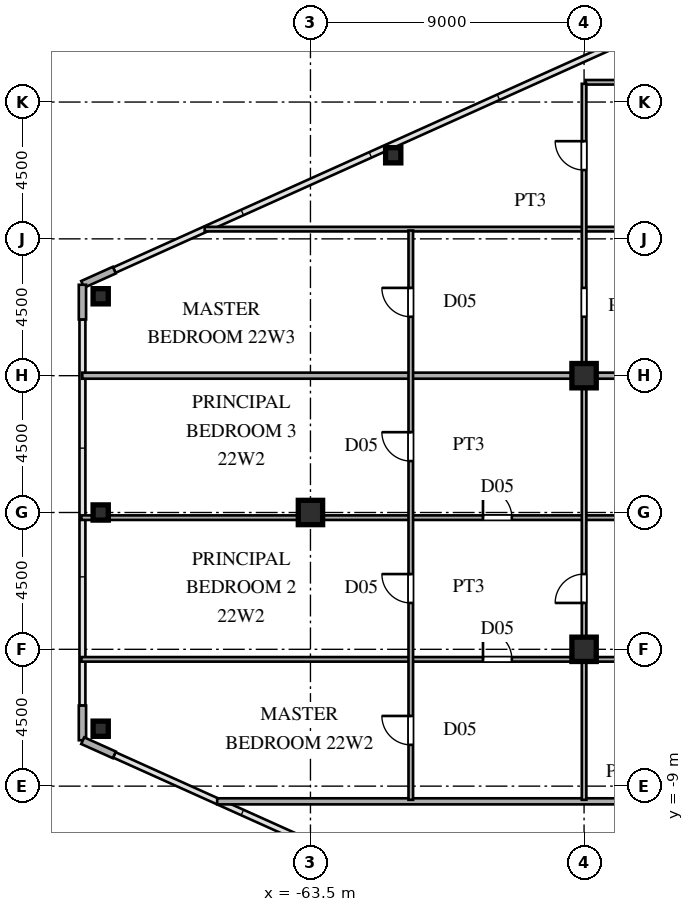
"""IFC4 building model, lengths in metres.
Left out: names, types, materials, properties, quantities, classifications, styles, units other than length and angle.
Written with IfcOpenShell. Run it as: python <this file> out.ifc"""

import sys

from ifc_helpers import new_model, si_unit, direction, frame, frame_2d, origin, origin_2d, place, context, subcontext, project, spatial, rectangle, hollow_rectangle, i_section, extrude, source, transform, mapped, element, fill, save


model = new_model("IFC4")
c1 = context("Model", 3, precision=1e-05, world=origin(), true_north=direction((0.0, 1.0)))
c2 = subcontext(c1, "Body", "Model", "MODEL_VIEW")
j1 = project(units=[si_unit("LENGTHUNIT", "METRE"), si_unit("PLANEANGLEUNIT", "RADIAN")], contexts=[c1])
p1 = place(None, origin())
s1 = spatial("IfcSite", under=j1, at=p1, CompositionType="ELEMENT")
p2 = place(p1, origin())
s2 = spatial("IfcBuilding", under=s1, at=p2, CompositionType="ELEMENT")
p3 = place(p2, frame((0.0, 0.0, 83.7)))
s3 = spatial("IfcBuildingStorey", under=s2, at=p3, CompositionType="ELEMENT", Elevation=83.7)
m1 = source(origin(), c2, "Body", "SweptSolid", [
    extrude(i_section(OverallWidth=0.8, OverallDepth=0.8, WebThickness=0.032, FlangeThickness=0.05, at=origin_2d()), origin(), (0.0, 0.0, 1.0), 3.6),
])
for number, where, z_axis, x_axis in (
    (1, (-54.5, -4.5, 0.0), (0.0, 0.0, 1.0), (1.0, 0.0, 0.0)),
    (2, (-54.5, 4.5, 0.0), (0.0, 0.0, 1.0), (1.0, 0.0, 0.0)),
    (3, (-63.5, 0.0, 0.0), (0.0, 0.0, 1.0), (1.0, 0.0, 0.0)),
):
    element("IfcColumn", number, at=place(p3, frame(where, z_axis=z_axis, x_axis=x_axis)), inside=s3, PredefinedType="COLUMN", context=c2, shape_type="MappedRepresentation", body=[
        mapped(m1, transform((0.0, 0.0, 0.0), scale=1.0)),
    ])
m2 = source(origin(), c2, "Body", "SweptSolid", [
    extrude(hollow_rectangle(XDim=0.5, YDim=0.5, WallThickness=0.02, at=origin_2d()), origin(), (0.0, 0.0, 1.0), 3.6),
])
for number, where, z_axis, x_axis in (
    (4, (-70.4, 7.112, 0.0), (0.0, 0.0, 1.0), (1.0, 0.0, 0.0)),
    (5, (-70.4, -7.112, 0.0), (0.0, 0.0, 1.0), (1.0, 0.0, 0.0)),
    (6, (-60.778, 11.749, 0.0), (0.0, 0.0, 1.0), (1.0, 0.0, 0.0)),
    (7, (-70.4, 0.0, 0.0), (0.0, 0.0, 1.0), (1.0, 0.0, 0.0)),
):
    element("IfcColumn", number, at=place(p3, frame(where, z_axis=z_axis, x_axis=x_axis)), inside=s3, PredefinedType="COLUMN", context=c2, shape_type="MappedRepresentation", body=[
        mapped(m2, transform((0.0, 0.0, 0.0), scale=1.0)),
    ])
for number, where, z_axis, x_axis in (
    (8, (-69.951, 7.972, 0.0), (0.0, 0.0, 1.0), (-0.912, -0.41, 0.0)),
    (9, (-71.0, 7.49, 0.0), (0.0, 0.0, 1.0), (0.0, -1.0, 0.0)),
    (10, (-71.0, -6.35, 0.0), (0.0, 0.0, 1.0), (0.0, -1.0, 0.0)),
    (11, (-70.991, -7.504, 0.0), (0.0, 0.0, 1.0), (0.912, -0.41, 0.0)),
):
    element("IfcWall", number, at=place(p3, frame(where, z_axis=z_axis, x_axis=x_axis)), inside=s3, PredefinedType="SOLIDWALL", context=c2, shape_type="SweptSolid", body=[
        extrude(rectangle(XDim=1.14, YDim=0.24, at=frame_2d((0.57, 0.0))), origin(), (0.0, 0.0, 1.0), 3.34),
    ])
p4 = place(p3, frame((-66.568, -9.5, 0.0), z_axis=(0.0, 0.0, 1.0), x_axis=(1.0, 0.0, 0.0)))
e12 = element("IfcWall", 12, at=p4, inside=s3, PredefinedType="PARTITIONING", context=c2, shape_type="SweptSolid", body=[
    extrude(rectangle(XDim=26.638, YDim=0.2, at=frame_2d((13.319, 0.0))), origin(), (0.0, 0.0, 1.0), 3.34),
])
p5 = place(p3, frame((-71.035, -4.83, 0.0), z_axis=(0.0, 0.0, 1.0), x_axis=(1.0, 0.0, 0.0)))
e13 = element("IfcWall", 13, at=p5, inside=s3, PredefinedType="PARTITIONING", context=c2, shape_type="SweptSolid", body=[
    extrude(rectangle(XDim=25.485, YDim=0.15, at=frame_2d((12.742, 0.0))), origin(), (0.0, 0.0, 1.0), 3.34),
])
p6 = place(p5, frame((20.56, 0.0, 0.0)))
e14 = element("IfcOpeningElement", 14, at=p6, cuts=e13, PredefinedType="OPENING", context=c2, shape_type="SweptSolid", body=[
    extrude(rectangle(XDim=0.95, YDim=2.15, at=frame_2d((0.475, 1.075))), frame((0.0, 0.085, 0.0), z_axis=(0.0, -1.0, 0.0), x_axis=(1.0, 0.0, 0.0)), (0.0, 0.0, 1.0), 0.17),
])
p7 = place(p5, frame((13.21, 0.0, 0.0)))
e15 = element("IfcOpeningElement", 15, at=p7, cuts=e13, PredefinedType="OPENING", context=c2, shape_type="SweptSolid", body=[
    extrude(rectangle(XDim=0.95, YDim=2.15, at=frame_2d((0.475, 1.075))), frame((0.0, 0.085, 0.0), z_axis=(0.0, -1.0, 0.0), x_axis=(1.0, 0.0, 0.0)), (0.0, 0.0, 1.0), 0.17),
])
p8 = place(p3, frame((-71.035, -0.17, 0.0), z_axis=(0.0, 0.0, 1.0), x_axis=(1.0, 0.0, 0.0)))
e16 = element("IfcWall", 16, at=p8, inside=s3, PredefinedType="PARTITIONING", context=c2, shape_type="SweptSolid", body=[
    extrude(rectangle(XDim=25.485, YDim=0.15, at=frame_2d((12.742, 0.0))), origin(), (0.0, 0.0, 1.0), 3.34),
])
p9 = place(p8, frame((20.56, 0.0, 0.0)))
e17 = element("IfcOpeningElement", 17, at=p9, cuts=e16, PredefinedType="OPENING", context=c2, shape_type="SweptSolid", body=[
    extrude(rectangle(XDim=0.95, YDim=2.15, at=frame_2d((0.475, 1.075))), frame((0.0, 0.085, 0.0), z_axis=(0.0, -1.0, 0.0), x_axis=(1.0, 0.0, 0.0)), (0.0, 0.0, 1.0), 0.17),
])
p10 = place(p8, frame((13.21, 0.0, 0.0)))
e18 = element("IfcOpeningElement", 18, at=p10, cuts=e16, PredefinedType="OPENING", context=c2, shape_type="SweptSolid", body=[
    extrude(rectangle(XDim=0.95, YDim=2.15, at=frame_2d((0.475, 1.075))), frame((0.0, 0.085, 0.0), z_axis=(0.0, -1.0, 0.0), x_axis=(1.0, 0.0, 0.0)), (0.0, 0.0, 1.0), 0.17),
])
p11 = place(p3, frame((-71.005, 4.5, 0.0), z_axis=(0.0, 0.0, 1.0), x_axis=(1.0, 0.0, 0.0)))
e19 = element("IfcWall", 19, at=p11, inside=s3, PredefinedType="PARTITIONING", context=c2, shape_type="SweptSolid", body=[
    extrude(rectangle(XDim=16.485, YDim=0.2, at=frame_2d((8.242, 0.0))), origin(), (0.0, 0.0, 1.0), 3.34),
])
p12 = place(p3, frame((-54.52, 4.5, 0.0), z_axis=(0.0, 0.0, 1.0), x_axis=(1.0, 0.0, 0.0)))
e20 = element("IfcWall", 20, at=p12, inside=s3, PredefinedType="PARTITIONING", context=c2, shape_type="SweptSolid", body=[
    extrude(rectangle(XDim=14.59, YDim=0.2, at=frame_2d((7.295, 0.0))), origin(), (0.0, 0.0, 1.0), 2.44),
])
p13 = place(p3, frame((-66.979, 9.32, 0.0), z_axis=(0.0, 0.0, 1.0), x_axis=(1.0, 0.0, 0.0)))
e21 = element("IfcWall", 21, at=p13, inside=s3, PredefinedType="PARTITIONING", context=c2, shape_type="SweptSolid", body=[
    extrude(rectangle(XDim=21.429, YDim=0.15, at=frame_2d((10.714, 0.0))), origin(), (0.0, 0.0, 1.0), 3.34),
])
p14 = place(p13, frame((16.504, 0.0, 0.0)))
e22 = element("IfcOpeningElement", 22, at=p14, cuts=e21, PredefinedType="OPENING", context=c2, shape_type="SweptSolid", body=[
    extrude(rectangle(XDim=0.95, YDim=2.15, at=frame_2d((0.475, 1.075))), frame((0.0, 0.085, 0.0), z_axis=(0.0, -1.0, 0.0), x_axis=(1.0, 0.0, 0.0)), (0.0, 0.0, 1.0), 0.17),
])
p15 = place(p3, frame((-54.45, 14.15, 0.0), z_axis=(0.0, 0.0, 1.0), x_axis=(1.0, 0.0, 0.0)))
e23 = element("IfcWall", 23, at=p15, inside=s3, PredefinedType="PARTITIONING", context=c2, shape_type="SweptSolid", body=[
    extrude(rectangle(XDim=8.9, YDim=0.15, at=frame_2d((4.45, 0.0))), origin(), (0.0, 0.0, 1.0), 3.34),
])
p16 = place(p15, frame((3.975, 0.0, 0.0)))
e24 = element("IfcOpeningElement", 24, at=p16, cuts=e23, PredefinedType="OPENING", context=c2, shape_type="SweptSolid", body=[
    extrude(rectangle(XDim=0.95, YDim=2.15, at=frame_2d((0.475, 1.075))), frame((0.0, 0.085, 0.0), z_axis=(0.0, -1.0, 0.0), x_axis=(1.0, 0.0, 0.0)), (0.0, 0.0, 1.0), 0.17),
])
p17 = place(p3, frame((-60.2, -9.45, 0.0), z_axis=(0.0, 0.0, 1.0), x_axis=(0.0, 1.0, 0.0)))
e25 = element("IfcWall", 25, at=p17, inside=s3, PredefinedType="PARTITIONING", context=c2, shape_type="SweptSolid", body=[
    extrude(rectangle(XDim=18.725, YDim=0.15, at=frame_2d((9.362, 0.0))), origin(), (0.0, 0.0, 1.0), 3.34),
])
p18 = place(p17, frame((1.808, 0.0, 0.0)))
e26 = element("IfcOpeningElement", 26, at=p18, cuts=e25, PredefinedType="OPENING", context=c2, shape_type="SweptSolid", body=[
    extrude(rectangle(XDim=0.95, YDim=2.15, at=frame_2d((0.475, 1.075))), frame((0.0, 0.085, 0.0), z_axis=(0.0, -1.0, 0.0), x_axis=(1.0, 0.0, 0.0)), (0.0, 0.0, 1.0), 0.17),
])
p19 = place(p17, frame((6.475, 0.0, 0.0)))
e27 = element("IfcOpeningElement", 27, at=p19, cuts=e25, PredefinedType="OPENING", context=c2, shape_type="SweptSolid", body=[
    extrude(rectangle(XDim=0.95, YDim=2.15, at=frame_2d((0.475, 1.075))), frame((0.0, 0.085, 0.0), z_axis=(0.0, -1.0, 0.0), x_axis=(1.0, 0.0, 0.0)), (0.0, 0.0, 1.0), 0.17),
])
p20 = place(p17, frame((11.142, 0.0, 0.0)))
e28 = element("IfcOpeningElement", 28, at=p20, cuts=e25, PredefinedType="OPENING", context=c2, shape_type="SweptSolid", body=[
    extrude(rectangle(XDim=0.95, YDim=2.15, at=frame_2d((0.475, 1.075))), frame((0.0, 0.085, 0.0), z_axis=(0.0, -1.0, 0.0), x_axis=(1.0, 0.0, 0.0)), (0.0, 0.0, 1.0), 0.17),
])
p21 = place(p17, frame((15.887, 0.0, 0.0)))
e29 = element("IfcOpeningElement", 29, at=p21, cuts=e25, PredefinedType="OPENING", context=c2, shape_type="SweptSolid", body=[
    extrude(rectangle(XDim=0.95, YDim=2.15, at=frame_2d((0.475, 1.075))), frame((0.0, 0.085, 0.0), z_axis=(0.0, -1.0, 0.0), x_axis=(1.0, 0.0, 0.0)), (0.0, 0.0, 1.0), 0.17),
])
p22 = place(p3, frame((-54.5, -9.45, 0.0), z_axis=(0.0, 0.0, 1.0), x_axis=(0.0, 1.0, 0.0)))
e30 = element("IfcWall", 30, at=p22, inside=s3, PredefinedType="PARTITIONING", context=c2, shape_type="SweptSolid", body=[
    extrude(rectangle(XDim=4.93, YDim=0.15, at=frame_2d((2.465, 0.0))), origin(), (0.0, 0.0, 1.0), 3.34),
])
p23 = place(p3, frame((-54.5, -4.52, 0.0), z_axis=(0.0, 0.0, 1.0), x_axis=(0.0, 1.0, 0.0)))
e31 = element("IfcWall", 31, at=p23, inside=s3, PredefinedType="PARTITIONING", context=c2, shape_type="SweptSolid", body=[
    extrude(rectangle(XDim=9.04, YDim=0.15, at=frame_2d((4.52, 0.0))), origin(), (0.0, 0.0, 1.0), 2.44),
])
p24 = place(p23, frame((1.545, 0.0, 0.0)))
e32 = element("IfcOpeningElement", 32, at=p24, cuts=e31, PredefinedType="OPENING", context=c2, shape_type="SweptSolid", body=[
    extrude(rectangle(XDim=0.95, YDim=2.15, at=frame_2d((0.475, 1.075))), frame((0.0, 0.085, 0.0), z_axis=(0.0, -1.0, 0.0), x_axis=(1.0, 0.0, 0.0)), (0.0, 0.0, 1.0), 0.17),
])
p25 = place(p3, frame((-54.5, 4.52, 0.0), z_axis=(0.0, 0.0, 1.0), x_axis=(0.0, 1.0, 0.0)))
e33 = element("IfcWall", 33, at=p25, inside=s3, PredefinedType="PARTITIONING", context=c2, shape_type="SweptSolid", body=[
    extrude(rectangle(XDim=9.58, YDim=0.15, at=frame_2d((4.79, 0.0))), origin(), (0.0, 0.0, 1.0), 3.34),
])
p26 = place(p25, frame((6.742, 0.0, 0.0)))
e34 = element("IfcOpeningElement", 34, at=p26, cuts=e33, PredefinedType="OPENING", context=c2, shape_type="SweptSolid", body=[
    extrude(rectangle(XDim=0.95, YDim=2.15, at=frame_2d((0.475, 1.075))), frame((0.0, 0.085, 0.0), z_axis=(0.0, -1.0, 0.0), x_axis=(1.0, 0.0, 0.0)), (0.0, 0.0, 1.0), 0.17),
])
p27 = place(p25, frame((1.917, 0.0, 0.0)))
e35 = element("IfcOpeningElement", 35, at=p27, cuts=e33, PredefinedType="OPENING", context=c2, shape_type="SweptSolid", body=[
    extrude(rectangle(XDim=0.95, YDim=2.15, at=frame_2d((0.475, 1.075))), frame((0.0, 0.085, 0.0), z_axis=(0.0, -1.0, 0.0), x_axis=(1.0, 0.0, 0.0)), (0.0, 0.0, 1.0), 0.17),
])
m3 = source(origin(), c2, "Body", "SweptSolid", [
    extrude(rectangle(XDim=0.95, YDim=2.15, at=frame_2d((0.475, 1.075))), frame((0.0, 0.025, 0.0), z_axis=(0.0, -1.0, 0.0), x_axis=(1.0, 0.0, 0.0)), (0.0, 0.0, 1.0), 0.05),
])
p28 = place(p7, origin())
e36 = element("IfcDoor", 36, at=p28, inside=s3, OperationType="SINGLE_SWING_LEFT", PredefinedType="DOOR", context=c2, shape_type="MappedRepresentation", body=[
    mapped(m3, transform((0.0, 0.0, 0.0), scale=1.0)),
])
fill(e15, e36)
p29 = place(p10, origin())
e37 = element("IfcDoor", 37, at=p29, inside=s3, OperationType="SINGLE_SWING_LEFT", PredefinedType="DOOR", context=c2, shape_type="MappedRepresentation", body=[
    mapped(m3, transform((0.0, 0.0, 0.0), scale=1.0)),
])
fill(e18, e37)
p30 = place(p18, origin())
e38 = element("IfcDoor", 38, at=p30, inside=s3, OperationType="SINGLE_SWING_RIGHT", PredefinedType="DOOR", context=c2, shape_type="MappedRepresentation", body=[
    mapped(m3, transform((0.0, 0.0, 0.0), scale=1.0)),
])
fill(e26, e38)
p31 = place(p19, origin())
e39 = element("IfcDoor", 39, at=p31, inside=s3, OperationType="SINGLE_SWING_RIGHT", PredefinedType="DOOR", context=c2, shape_type="MappedRepresentation", body=[
    mapped(m3, transform((0.0, 0.0, 0.0), scale=1.0)),
])
fill(e27, e39)
p32 = place(p20, origin())
e40 = element("IfcDoor", 40, at=p32, inside=s3, OperationType="SINGLE_SWING_RIGHT", PredefinedType="DOOR", context=c2, shape_type="MappedRepresentation", body=[
    mapped(m3, transform((0.0, 0.0, 0.0), scale=1.0)),
])
fill(e28, e40)
p33 = place(p21, origin())
e41 = element("IfcDoor", 41, at=p33, inside=s3, OperationType="SINGLE_SWING_RIGHT", PredefinedType="DOOR", context=c2, shape_type="MappedRepresentation", body=[
    mapped(m3, transform((0.0, 0.0, 0.0), scale=1.0)),
])
fill(e29, e41)
p34 = place(p24, origin())
e42 = element("IfcDoor", 42, at=p34, inside=s3, OperationType="SINGLE_SWING_LEFT", PredefinedType="DOOR", context=c2, shape_type="MappedRepresentation", body=[
    mapped(m3, transform((0.0, 0.0, 0.0), scale=1.0)),
])
fill(e32, e42)
p35 = place(p26, origin())
e43 = element("IfcDoor", 43, at=p35, inside=s3, OperationType="SINGLE_SWING_RIGHT", PredefinedType="DOOR", context=c2, shape_type="MappedRepresentation", body=[
    mapped(m3, transform((0.0, 0.0, 0.0), scale=1.0)),
])
fill(e34, e43)
save(model, sys.argv[1])
